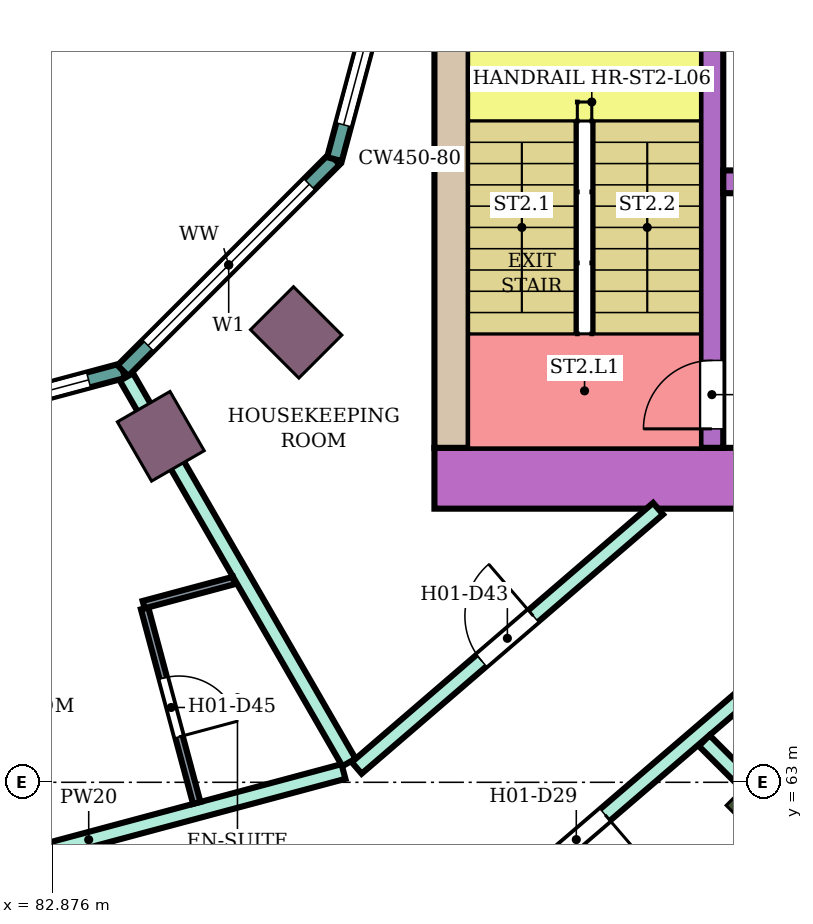
"""IFC4 building model, lengths in metres.
Left out: names, types, materials, properties, quantities, classifications, styles, units other than length and angle.
Written with IfcOpenShell. Run it as: python <this file> out.ifc"""

import sys

from ifc_helpers import new_model, si_unit, direction, frame, frame_2d, origin, origin_2d, place, context, subcontext, project, spatial, rectangle, extrude, element, fill, save


model = new_model("IFC4")
c1 = context("Model", 3, precision=1e-05, world=origin(), true_north=direction((0.0, 1.0)))
c2 = subcontext(c1, "Body", "Model", "MODEL_VIEW")
j1 = project(units=[si_unit("LENGTHUNIT", "METRE"), si_unit("PLANEANGLEUNIT", "RADIAN")], contexts=[c1])
p1 = place(None, origin())
s1 = spatial("IfcSite", under=j1, at=p1, CompositionType="ELEMENT")
p2 = place(p1, origin())
s2 = spatial("IfcBuilding", under=s1, at=p2, CompositionType="ELEMENT")
p3 = place(p2, frame((0.0, 0.0, 32.6)))
s3 = spatial("IfcBuildingStorey", under=s2, at=p3, CompositionType="ELEMENT", Elevation=32.6)
p4 = place(p3, frame((92.445, 62.555, 0.0), z_axis=(0.0, 0.0, 1.0), x_axis=(0.707106781187, -0.707106781187, 0.0)))
e1 = element("IfcColumn", 1, at=p4, inside=s3, PredefinedType="COLUMN", context=c2, shape_type="SweptSolid", body=[
    extrude(rectangle(XDim=1.2, YDim=0.8, at=origin_2d()), origin(), (0.0, 0.0, 1.0), 3.8),
])
for number, where, z_axis, x_axis in (
    (2, (84.3, 67.552, 0.0), (0.0, 0.0, 1.0), (0.5, -0.866, 0.0)),
    (3, (86.081, 68.919, 0.0), (0.0, 0.0, 1.0), (0.707, -0.707, 0.0)),
):
    element("IfcColumn", number, at=place(p3, frame(where, z_axis=z_axis, x_axis=x_axis)), inside=s3, PredefinedType="COLUMN", context=c2, shape_type="SweptSolid", body=[
        extrude(rectangle(XDim=0.9, YDim=0.8, at=origin_2d()), origin(), (0.0, 0.0, 1.0), 3.8),
    ])
p5 = place(p3, frame((87.9, 67.0, 0.0), z_axis=(0.0, 0.0, 1.0), x_axis=(1.0, 0.0, 0.0)))
e4 = element("IfcWall", 4, at=p5, inside=s3, PredefinedType="SHEAR", context=c2, shape_type="SweptSolid", body=[
    extrude(rectangle(XDim=14.7, YDim=0.8, at=frame_2d((7.35, 0.0))), origin(), (0.0, 0.0, 1.0), 3.48),
])
p6 = place(p5, frame((4.2, 0.0, 0.0)))
e5 = element("IfcOpeningElement", 5, at=p6, cuts=e4, PredefinedType="OPENING", context=c2, shape_type="SweptSolid", body=[
    extrude(rectangle(XDim=2.4, YDim=2.4, at=frame_2d((1.2, 1.2))), frame((0.0, 0.41, 0.0), z_axis=(0.0, -1.0, 0.0), x_axis=(1.0, 0.0, 0.0)), (0.0, 0.0, 1.0), 0.82),
])
p7 = place(p3, frame((88.125, 67.4, 0.0), z_axis=(0.0, 0.0, 1.0), x_axis=(0.0, 1.0, 0.0)))
e6 = element("IfcWall", 6, at=p7, inside=s3, PredefinedType="SHEAR", context=c2, shape_type="SweptSolid", body=[
    extrude(rectangle(XDim=7.6, YDim=0.45, at=frame_2d((3.8, 0.0))), origin(), (0.0, 0.0, 1.0), 3.48),
])
p8 = place(p3, frame((91.55, 67.4, 0.0), z_axis=(0.0, 0.0, 1.0), x_axis=(0.0, 1.0, 0.0)))
e7 = element("IfcWall", 7, at=p8, inside=s3, PredefinedType="SHEAR", context=c2, shape_type="SweptSolid", body=[
    extrude(rectangle(XDim=7.6, YDim=0.3, at=frame_2d((3.8, 0.0))), origin(), (0.0, 0.0, 1.0), 3.48),
])
p9 = place(p8, frame((0.25, 0.0, 0.0)))
e8 = element("IfcOpeningElement", 8, at=p9, cuts=e7, PredefinedType="OPENING", context=c2, shape_type="SweptSolid", body=[
    extrude(rectangle(XDim=0.9, YDim=2.1, at=frame_2d((0.45, 1.05))), frame((0.0, 0.16, 0.0), z_axis=(0.0, -1.0, 0.0), x_axis=(1.0, 0.0, 0.0)), (0.0, 0.0, 1.0), 0.32),
])
p10 = place(p3, frame((91.7, 70.9, 0.0), z_axis=(0.0, 0.0, 1.0), x_axis=(1.0, 0.0, 0.0)))
e9 = element("IfcWall", 9, at=p10, inside=s3, PredefinedType="SHEAR", context=c2, shape_type="SweptSolid", body=[
    extrude(rectangle(XDim=10.9, YDim=0.3, at=frame_2d((5.45, 0.0))), origin(), (0.0, 0.0, 1.0), 3.48),
])
p11 = place(p10, frame((0.4, 0.0, 0.0)))
e10 = element("IfcOpeningElement", 10, at=p11, cuts=e9, PredefinedType="OPENING", context=c2, shape_type="SweptSolid", body=[
    extrude(rectangle(XDim=1.4, YDim=2.1, at=frame_2d((0.7, 1.05))), frame((0.0, 0.16, 0.0), z_axis=(0.0, -1.0, 0.0), x_axis=(1.0, 0.0, 0.0)), (0.0, 0.0, 1.0), 0.32),
])
p12 = place(p10, frame((5.4, 0.0, 0.0)))
e11 = element("IfcOpeningElement", 11, at=p12, cuts=e9, PredefinedType="OPENING", context=c2, shape_type="SweptSolid", body=[
    extrude(rectangle(XDim=1.4, YDim=2.1, at=frame_2d((0.7, 1.05))), frame((0.0, 0.16, 0.0), z_axis=(0.0, -1.0, 0.0), x_axis=(1.0, 0.0, 0.0)), (0.0, 0.0, 1.0), 0.32),
])
p13 = place(p10, frame((8.1, 0.0, 0.0)))
e12 = element("IfcOpeningElement", 12, at=p13, cuts=e9, PredefinedType="OPENING", context=c2, shape_type="SweptSolid", body=[
    extrude(rectangle(XDim=1.0, YDim=2.1, at=frame_2d((0.5, 1.05))), frame((0.0, 0.16, 0.0), z_axis=(0.0, -1.0, 0.0), x_axis=(1.0, 0.0, 0.0)), (0.0, 0.0, 1.0), 0.32),
])
p14 = place(p3, frame((80.0, 67.396, 0.0), z_axis=(0.0, 0.0, 1.0), x_axis=(0.965933654434, 0.258789828301, 0.0)))
e13 = element("IfcWall", 13, at=p14, inside=s3, PredefinedType="NOTDEFINED", context=c2, shape_type="SweptSolid", body=[
    extrude(rectangle(XDim=3.936, YDim=0.2, at=frame_2d((1.968, 0.0))), origin(), (0.0, 0.0, 1.0), 3.8),
])
p15 = place(p14, frame((0.468, 0.0, 0.9)))
e14 = element("IfcOpeningElement", 14, at=p15, cuts=e13, PredefinedType="OPENING", context=c2, shape_type="SweptSolid", body=[
    extrude(rectangle(XDim=3.0, YDim=2.3, at=frame_2d((1.5, 1.15))), frame((0.0, 0.11, 0.0), z_axis=(0.0, -1.0, 0.0), x_axis=(1.0, 0.0, 0.0)), (0.0, 0.0, 1.0), 0.22),
])
p16 = place(p3, frame((83.802, 68.415, 0.0), z_axis=(0.0, 0.0, 1.0), x_axis=(0.707106781187, 0.707106781187, 0.0)))
e15 = element("IfcWall", 15, at=p16, inside=s3, PredefinedType="NOTDEFINED", context=c2, shape_type="SweptSolid", body=[
    extrude(rectangle(XDim=3.936, YDim=0.2, at=frame_2d((1.968, 0.0))), origin(), (0.0, 0.0, 1.0), 3.8),
])
p17 = place(p16, frame((0.468, 0.0, 0.9)))
e16 = element("IfcOpeningElement", 16, at=p17, cuts=e15, PredefinedType="OPENING", context=c2, shape_type="SweptSolid", body=[
    extrude(rectangle(XDim=3.0, YDim=2.3, at=frame_2d((1.5, 1.15))), frame((0.0, 0.11, 0.0), z_axis=(0.0, -1.0, 0.0), x_axis=(1.0, 0.0, 0.0)), (0.0, 0.0, 1.0), 0.22),
])
p18 = place(p3, frame((86.585, 71.198, 0.0), z_axis=(0.0, 0.0, 1.0), x_axis=(0.258789828301, 0.965933654434, 0.0)))
e17 = element("IfcWall", 17, at=p18, inside=s3, PredefinedType="NOTDEFINED", context=c2, shape_type="SweptSolid", body=[
    extrude(rectangle(XDim=3.936, YDim=0.2, at=frame_2d((1.968, 0.0))), origin(), (0.0, 0.0, 1.0), 3.8),
])
p19 = place(p18, frame((0.468, 0.0, 0.9)))
e18 = element("IfcOpeningElement", 18, at=p19, cuts=e17, PredefinedType="OPENING", context=c2, shape_type="SweptSolid", body=[
    extrude(rectangle(XDim=3.0, YDim=2.3, at=frame_2d((1.5, 1.15))), frame((0.0, 0.11, 0.0), z_axis=(0.0, -1.0, 0.0), x_axis=(1.0, 0.0, 0.0)), (0.0, 0.0, 1.0), 0.22),
])
p20 = place(p3, frame((80.0, 61.346, 0.0), z_axis=(0.0, 0.0, 1.0), x_axis=(0.965924181808, 0.258825182312, 0.0)))
e19 = element("IfcWall", 19, at=p20, inside=s3, PredefinedType="PARTITIONING", context=c2, shape_type="SweptSolid", body=[
    extrude(rectangle(XDim=6.94, YDim=0.2, at=frame_2d((3.47, 0.0))), origin(), (0.0, 0.0, 1.0), 3.35),
])
p21 = place(p20, frame((0.55, 0.0, 0.0)))
e20 = element("IfcOpeningElement", 20, at=p21, cuts=e19, PredefinedType="OPENING", context=c2, shape_type="SweptSolid", body=[
    extrude(rectangle(XDim=1.0, YDim=2.1, at=frame_2d((0.5, 1.05))), frame((0.0, 0.11, 0.0), z_axis=(0.0, -1.0, 0.0), x_axis=(1.0, 0.0, 0.0)), (0.0, 0.0, 1.0), 0.22),
])
p22 = place(p3, frame((83.848, 68.333, 0.0), z_axis=(0.0, 0.0, 1.0), x_axis=(0.499951054106, -0.866053660865, 0.0)))
e21 = element("IfcWall", 21, at=p22, inside=s3, PredefinedType="PARTITIONING", context=c2, shape_type="SweptSolid", body=[
    extrude(rectangle(XDim=5.855, YDim=0.2, at=frame_2d((2.927, 0.0))), origin(), (0.0, 0.0, 1.0), 3.35),
])
p23 = place(p3, frame((86.877, 63.189, 0.0), z_axis=(0.0, 0.0, 1.0), x_axis=(0.758075808328, 0.652166442581, 0.0)))
e22 = element("IfcWall", 22, at=p23, inside=s3, PredefinedType="PARTITIONING", context=c2, shape_type="SweptSolid", body=[
    extrude(rectangle(XDim=5.23, YDim=0.2, at=frame_2d((2.615, 0.0))), origin(), (0.0, 0.0, 1.0), 3.35),
])
p24 = place(p23, frame((2.165, 0.0, 0.0)))
e23 = element("IfcOpeningElement", 23, at=p24, cuts=e22, PredefinedType="OPENING", context=c2, shape_type="SweptSolid", body=[
    extrude(rectangle(XDim=0.9, YDim=2.1, at=frame_2d((0.45, 1.05))), frame((0.0, 0.11, 0.0), z_axis=(0.0, -1.0, 0.0), x_axis=(1.0, 0.0, 0.0)), (0.0, 0.0, 1.0), 0.22),
])
p25 = place(p3, frame((88.235, 60.931, 0.0), z_axis=(0.0, 0.0, 1.0), x_axis=(0.758799498714, 0.651324282329, 0.0)))
e24 = element("IfcWall", 24, at=p25, inside=s3, PredefinedType="PARTITIONING", context=c2, shape_type="SweptSolid", body=[
    extrude(rectangle(XDim=6.186, YDim=0.2, at=frame_2d((3.093, 0.0))), origin(), (0.0, 0.0, 1.0), 3.35),
])
p26 = place(p25, frame((1.519, 0.0, 0.0)))
e25 = element("IfcOpeningElement", 25, at=p26, cuts=e24, PredefinedType="OPENING", context=c2, shape_type="SweptSolid", body=[
    extrude(rectangle(XDim=1.0, YDim=2.1, at=frame_2d((0.5, 1.05))), frame((0.0, 0.11, 0.0), z_axis=(0.0, -1.0, 0.0), x_axis=(1.0, 0.0, 0.0)), (0.0, 0.0, 1.0), 0.22),
])
p27 = place(p3, frame((91.449, 63.548, 0.0), z_axis=(0.0, 0.0, 1.0), x_axis=(0.706984804638, -0.707228736698, 0.0)))
e26 = element("IfcWall", 26, at=p27, inside=s3, PredefinedType="PARTITIONING", context=c2, shape_type="SweptSolid", body=[
    extrude(rectangle(XDim=7.006, YDim=0.2, at=frame_2d((3.503, 0.0))), origin(), (0.0, 0.0, 1.0), 3.35),
])
p28 = place(p3, frame((84.087, 65.289, 0.0), z_axis=(0.0, 0.0, 1.0), x_axis=(0.258929459649, -0.965896234037, 0.0)))
e27 = element("IfcWall", 27, at=p28, inside=s3, PredefinedType="PARTITIONING", context=c2, shape_type="SweptSolid", body=[
    extrude(rectangle(XDim=2.65, YDim=0.1, at=frame_2d((1.325, 0.0))), origin(), (0.0, 0.0, 1.0), 3.35),
])
p29 = place(p28, frame((0.95, 0.0, 0.0)))
e28 = element("IfcOpeningElement", 28, at=p29, cuts=e27, PredefinedType="OPENING", context=c2, shape_type="SweptSolid", body=[
    extrude(rectangle(XDim=0.8, YDim=2.1, at=frame_2d((0.4, 1.05))), frame((0.0, 0.06, 0.0), z_axis=(0.0, -1.0, 0.0), x_axis=(1.0, 0.0, 0.0)), (0.0, 0.0, 1.0), 0.12),
])
p30 = place(p3, frame((84.074, 65.337, 0.0), z_axis=(0.0, 0.0, 1.0), x_axis=(0.965914351064, 0.258861867428, 0.0)))
e29 = element("IfcWall", 29, at=p30, inside=s3, PredefinedType="PARTITIONING", context=c2, shape_type="SweptSolid", body=[
    extrude(rectangle(XDim=1.229, YDim=0.1, at=frame_2d((0.615, 0.0))), origin(), (0.0, 0.0, 1.0), 3.35),
])
p31 = place(p15, origin())
e30 = element("IfcWindow", 30, at=p31, inside=s3, PartitioningType="SINGLE_PANEL", PredefinedType="WINDOW", context=c2, shape_type="SweptSolid", body=[
    extrude(rectangle(XDim=3.0, YDim=2.3, at=frame_2d((1.5, 1.15))), frame((0.0, 0.03, 0.0), z_axis=(0.0, -1.0, 0.0), x_axis=(1.0, 0.0, 0.0)), (0.0, 0.0, 1.0), 0.06),
])
fill(e14, e30)
p32 = place(p17, origin())
e31 = element("IfcWindow", 31, at=p32, inside=s3, PartitioningType="SINGLE_PANEL", PredefinedType="WINDOW", context=c2, shape_type="SweptSolid", body=[
    extrude(rectangle(XDim=3.0, YDim=2.3, at=frame_2d((1.5, 1.15))), frame((0.0, 0.03, 0.0), z_axis=(0.0, -1.0, 0.0), x_axis=(1.0, 0.0, 0.0)), (0.0, 0.0, 1.0), 0.06),
])
fill(e16, e31)
p33 = place(p19, origin())
e32 = element("IfcWindow", 32, at=p33, inside=s3, PartitioningType="SINGLE_PANEL", PredefinedType="WINDOW", context=c2, shape_type="SweptSolid", body=[
    extrude(rectangle(XDim=3.0, YDim=2.3, at=frame_2d((1.5, 1.15))), frame((0.0, 0.03, 0.0), z_axis=(0.0, -1.0, 0.0), x_axis=(1.0, 0.0, 0.0)), (0.0, 0.0, 1.0), 0.06),
])
fill(e18, e32)
p34 = place(p26, frame((1.0, 0.0, 0.0), z_axis=(0.0, 0.0, 1.0), x_axis=(-1.0, 0.0, 0.0)))
e33 = element("IfcDoor", 33, at=p34, inside=s3, OperationType="SINGLE_SWING_LEFT", PredefinedType="DOOR", context=c2, shape_type="SweptSolid", body=[
    extrude(rectangle(XDim=1.0, YDim=2.1, at=frame_2d((0.5, 1.05))), frame((0.0, 0.025, 0.0), z_axis=(0.0, -1.0, 0.0), x_axis=(1.0, 0.0, 0.0)), (0.0, 0.0, 1.0), 0.05),
])
fill(e25, e33)
p35 = place(p24, origin())
e34 = element("IfcDoor", 34, at=p35, inside=s3, OperationType="SINGLE_SWING_RIGHT", PredefinedType="DOOR", context=c2, shape_type="SweptSolid", body=[
    extrude(rectangle(XDim=0.9, YDim=2.1, at=frame_2d((0.45, 1.05))), frame((0.0, 0.025, 0.0), z_axis=(0.0, -1.0, 0.0), x_axis=(1.0, 0.0, 0.0)), (0.0, 0.0, 1.0), 0.05),
])
fill(e23, e34)
p36 = place(p29, origin())
e35 = element("IfcDoor", 35, at=p36, inside=s3, OperationType="SINGLE_SWING_RIGHT", PredefinedType="DOOR", context=c2, shape_type="SweptSolid", body=[
    extrude(rectangle(XDim=0.8, YDim=2.1, at=frame_2d((0.4, 1.05))), frame((0.0, 0.025, 0.0), z_axis=(0.0, -1.0, 0.0), x_axis=(1.0, 0.0, 0.0)), (0.0, 0.0, 1.0), 0.05),
])
fill(e28, e35)
p37 = place(p9, origin())
e36 = element("IfcDoor", 36, at=p37, inside=s3, OperationType="SINGLE_SWING_LEFT", PredefinedType="DOOR", context=c2, shape_type="SweptSolid", body=[
    extrude(rectangle(XDim=0.9, YDim=2.1, at=frame_2d((0.45, 1.05))), frame((0.0, 0.025, 0.0), z_axis=(0.0, -1.0, 0.0), x_axis=(1.0, 0.0, 0.0)), (0.0, 0.0, 1.0), 0.05),
])
fill(e8, e36)
save(model, sys.argv[1])
